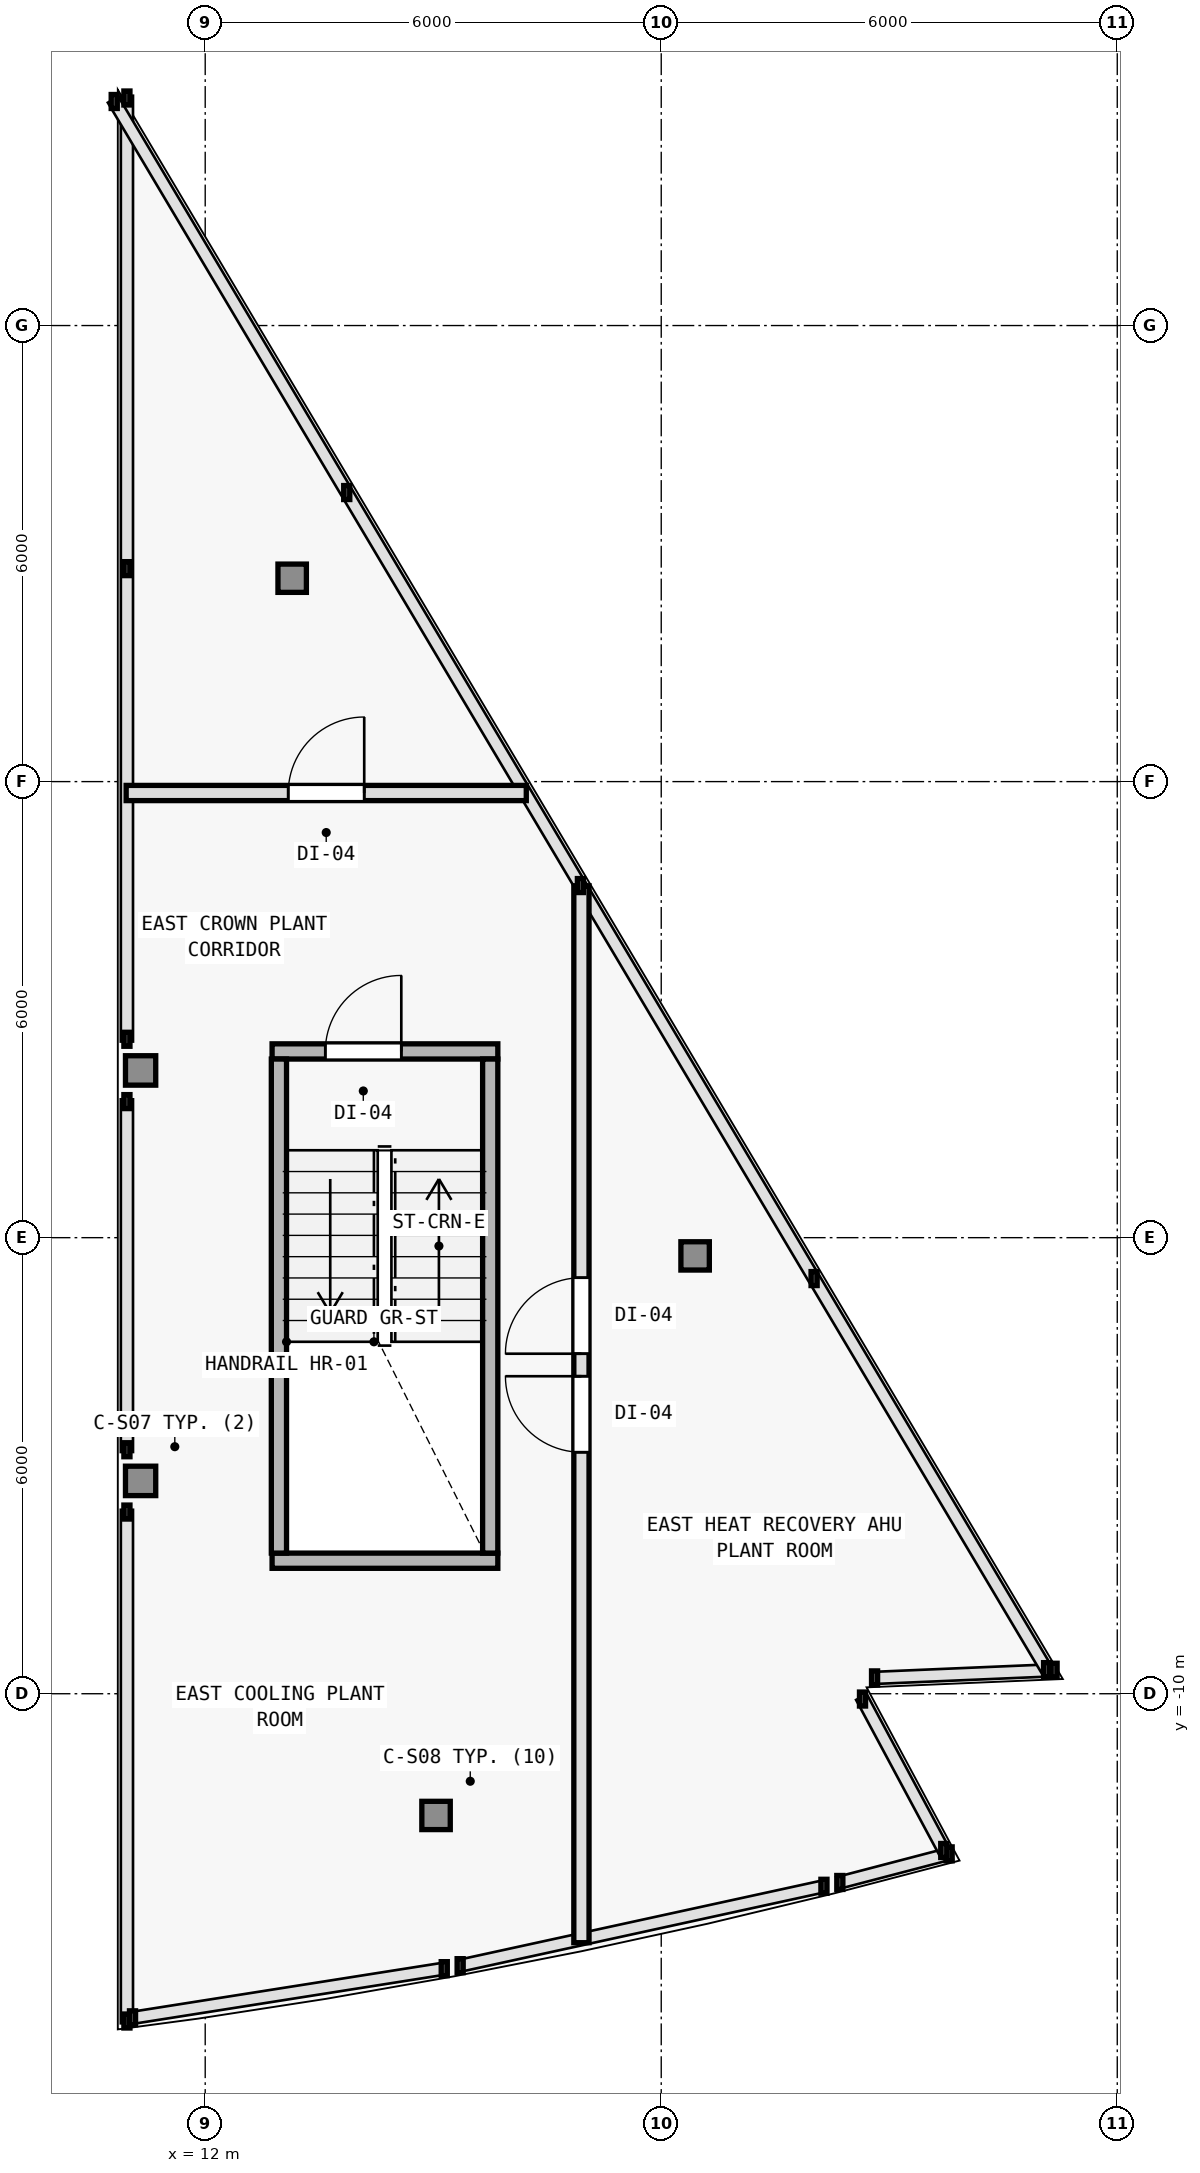
"""IFC4 building model, lengths in metres.
Left out: names, types, materials, properties, quantities, classifications, styles, units other than length and angle.
Written with IfcOpenShell. Run it as: python <this file> out.ifc"""

import sys

from ifc_helpers import new_model, si_unit, direction, frame, frame_2d, origin, origin_2d, place, context, subcontext, project, spatial, rectangle, i_section, extrude, element, fill, save


model = new_model("IFC4")
c1 = context("Model", 3, precision=1e-05, world=origin(), true_north=direction((0.0, 1.0)))
c2 = subcontext(c1, "Body", "Model", "MODEL_VIEW")
j1 = project(units=[si_unit("LENGTHUNIT", "METRE"), si_unit("PLANEANGLEUNIT", "RADIAN")], contexts=[c1])
p1 = place(None, origin())
s1 = spatial("IfcSite", under=j1, at=p1, CompositionType="ELEMENT")
p2 = place(p1, origin())
s2 = spatial("IfcBuilding", under=s1, at=p2, CompositionType="ELEMENT")
p3 = place(p2, frame((0.0, 0.0, 304.8)))
s3 = spatial("IfcBuildingStorey", under=s2, at=p3, CompositionType="ELEMENT", Elevation=304.8)
for number, where, z_axis, x_axis in (
    (1, (11.15, -7.2, 0.0), (0.0, 0.0, 1.0), (1.0, 0.0, 0.0)),
    (2, (11.15, -1.8, 0.0), (0.0, 0.0, 1.0), (1.0, 0.0, 0.0)),
):
    element("IfcColumn", number, at=place(p3, frame(where, z_axis=z_axis, x_axis=x_axis)), inside=s3, PredefinedType="COLUMN", context=c2, shape_type="SweptSolid", body=[
        extrude(i_section(OverallWidth=0.398, OverallDepth=0.387, WebThickness=0.013, FlangeThickness=0.022, FilletRadius=0.015, at=origin_2d()), origin(), (0.0, 0.0, 1.0), 3.6),
    ])
for number, where, z_axis, x_axis in (
    (3, (15.037, -11.602, 0.0), (0.0, 0.0, 1.0), (1.0, 0.0, 0.0)),
    (4, (18.446, -4.24, 0.0), (0.0, 0.0, 1.0), (1.0, 0.0, 0.0)),
    (5, (13.144, 4.676, 0.0), (0.0, 0.0, 1.0), (1.0, 0.0, 0.0)),
):
    element("IfcColumn", number, at=place(p3, frame(where, z_axis=z_axis, x_axis=x_axis)), inside=s3, PredefinedType="COLUMN", context=c2, shape_type="SweptSolid", body=[
        extrude(i_section(OverallWidth=0.374, OverallDepth=0.372, WebThickness=0.012, FlangeThickness=0.02, FilletRadius=0.015, at=origin_2d()), origin(), (0.0, 0.0, 1.0), 3.6),
    ])
p4 = place(p3, frame((12.88, -8.25, 0.0), z_axis=(0.0, 0.0, 1.0), x_axis=(1.0, 0.0, 0.0)))
e6 = element("IfcWall", 6, at=p4, inside=s3, PredefinedType="SOLIDWALL", context=c2, shape_type="SweptSolid", body=[
    extrude(rectangle(XDim=2.97, YDim=0.2, at=frame_2d((1.485, 0.0))), origin(), (0.0, 0.0, 1.0), 3.34),
])
p5 = place(p3, frame((12.88, -1.55, 0.0), z_axis=(0.0, 0.0, 1.0), x_axis=(1.0, 0.0, 0.0)))
e7 = element("IfcWall", 7, at=p5, inside=s3, PredefinedType="SOLIDWALL", context=c2, shape_type="SweptSolid", body=[
    extrude(rectangle(XDim=2.97, YDim=0.2, at=frame_2d((1.485, 0.0))), origin(), (0.0, 0.0, 1.0), 3.34),
])
p6 = place(p5, frame((0.7, 0.0, 0.0)))
e8 = element("IfcOpeningElement", 8, at=p6, cuts=e7, PredefinedType="OPENING", context=c2, shape_type="SweptSolid", body=[
    extrude(rectangle(XDim=1.0, YDim=2.15, at=frame_2d((0.5, 1.075))), frame((0.0, 0.11, 0.0), z_axis=(0.0, -1.0, 0.0), x_axis=(1.0, 0.0, 0.0)), (0.0, 0.0, 1.0), 0.22),
])
for number, where, z_axis, x_axis in (
    (9, (12.97, -8.15, 0.0), (0.0, 0.0, 1.0), (0.0, 1.0, 0.0)),
    (10, (15.75, -8.15, 0.0), (0.0, 0.0, 1.0), (0.0, 1.0, 0.0)),
):
    element("IfcWall", number, at=place(p3, frame(where, z_axis=z_axis, x_axis=x_axis)), inside=s3, PredefinedType="SOLIDWALL", context=c2, shape_type="SweptSolid", body=[
        extrude(rectangle(XDim=6.5, YDim=0.2, at=frame_2d((3.25, 0.0))), origin(), (0.0, 0.0, 1.0), 3.34),
    ])
p7 = place(p3, frame((16.95, -13.276, 0.0), z_axis=(0.0, 0.0, 1.0), x_axis=(0.0, 1.0, 0.0)))
e11 = element("IfcWall", 11, at=p7, inside=s3, PredefinedType="SOLIDWALL", context=c2, shape_type="SweptSolid", body=[
    extrude(rectangle(XDim=13.906, YDim=0.2, at=frame_2d((6.953, 0.0))), origin(), (0.0, 0.0, 1.0), 2.865),
])
p8 = place(p7, frame((6.453, 0.0, 0.0)))
e12 = element("IfcOpeningElement", 12, at=p8, cuts=e11, PredefinedType="OPENING", context=c2, shape_type="SweptSolid", body=[
    extrude(rectangle(XDim=1.0, YDim=2.15, at=frame_2d((0.5, 1.075))), frame((0.0, 0.11, 0.0), z_axis=(0.0, -1.0, 0.0), x_axis=(1.0, 0.0, 0.0)), (0.0, 0.0, 1.0), 0.22),
])
p9 = place(p7, frame((7.749, 0.0, 0.0)))
e13 = element("IfcOpeningElement", 13, at=p9, cuts=e11, PredefinedType="OPENING", context=c2, shape_type="SweptSolid", body=[
    extrude(rectangle(XDim=1.0, YDim=2.15, at=frame_2d((0.5, 1.075))), frame((0.0, 0.11, 0.0), z_axis=(0.0, -1.0, 0.0), x_axis=(1.0, 0.0, 0.0)), (0.0, 0.0, 1.0), 0.22),
])
p10 = place(p3, frame((10.96, 1.85, 0.0), z_axis=(0.0, 0.0, 1.0), x_axis=(1.0, 0.0, 0.0)))
e14 = element("IfcWall", 14, at=p10, inside=s3, PredefinedType="SOLIDWALL", context=c2, shape_type="SweptSolid", body=[
    extrude(rectangle(XDim=5.264, YDim=0.2, at=frame_2d((2.632, 0.0))), origin(), (0.0, 0.0, 1.0), 2.865),
])
p11 = place(p10, frame((2.132, 0.0, 0.0)))
e15 = element("IfcOpeningElement", 15, at=p11, cuts=e14, PredefinedType="OPENING", context=c2, shape_type="SweptSolid", body=[
    extrude(rectangle(XDim=1.0, YDim=2.15, at=frame_2d((0.5, 1.075))), frame((0.0, 0.11, 0.0), z_axis=(0.0, -1.0, 0.0), x_axis=(1.0, 0.0, 0.0)), (0.0, 0.0, 1.0), 0.22),
])
p12 = place(p6, origin())
e16 = element("IfcDoor", 16, at=p12, inside=s3, OperationType="SINGLE_SWING_RIGHT", PredefinedType="DOOR", context=c2, shape_type="SweptSolid", body=[
    extrude(rectangle(XDim=1.0, YDim=2.15, at=frame_2d((0.5, 1.075))), frame((0.0, 0.025, 0.0), z_axis=(0.0, -1.0, 0.0), x_axis=(1.0, 0.0, 0.0)), (0.0, 0.0, 1.0), 0.05),
])
fill(e8, e16)
p13 = place(p8, origin())
e17 = element("IfcDoor", 17, at=p13, inside=s3, OperationType="SINGLE_SWING_RIGHT", PredefinedType="DOOR", context=c2, shape_type="SweptSolid", body=[
    extrude(rectangle(XDim=1.0, YDim=2.15, at=frame_2d((0.5, 1.075))), frame((0.0, 0.025, 0.0), z_axis=(0.0, -1.0, 0.0), x_axis=(1.0, 0.0, 0.0)), (0.0, 0.0, 1.0), 0.05),
])
fill(e12, e17)
p14 = place(p9, origin())
e18 = element("IfcDoor", 18, at=p14, inside=s3, OperationType="SINGLE_SWING_LEFT", PredefinedType="DOOR", context=c2, shape_type="SweptSolid", body=[
    extrude(rectangle(XDim=1.0, YDim=2.15, at=frame_2d((0.5, 1.075))), frame((0.0, 0.025, 0.0), z_axis=(0.0, -1.0, 0.0), x_axis=(1.0, 0.0, 0.0)), (0.0, 0.0, 1.0), 0.05),
])
fill(e13, e18)
p15 = place(p11, origin())
e19 = element("IfcDoor", 19, at=p15, inside=s3, OperationType="SINGLE_SWING_RIGHT", PredefinedType="DOOR", context=c2, shape_type="SweptSolid", body=[
    extrude(rectangle(XDim=1.0, YDim=2.15, at=frame_2d((0.5, 1.075))), frame((0.0, 0.025, 0.0), z_axis=(0.0, -1.0, 0.0), x_axis=(1.0, 0.0, 0.0)), (0.0, 0.0, 1.0), 0.05),
])
fill(e15, e19)
save(model, sys.argv[1])
